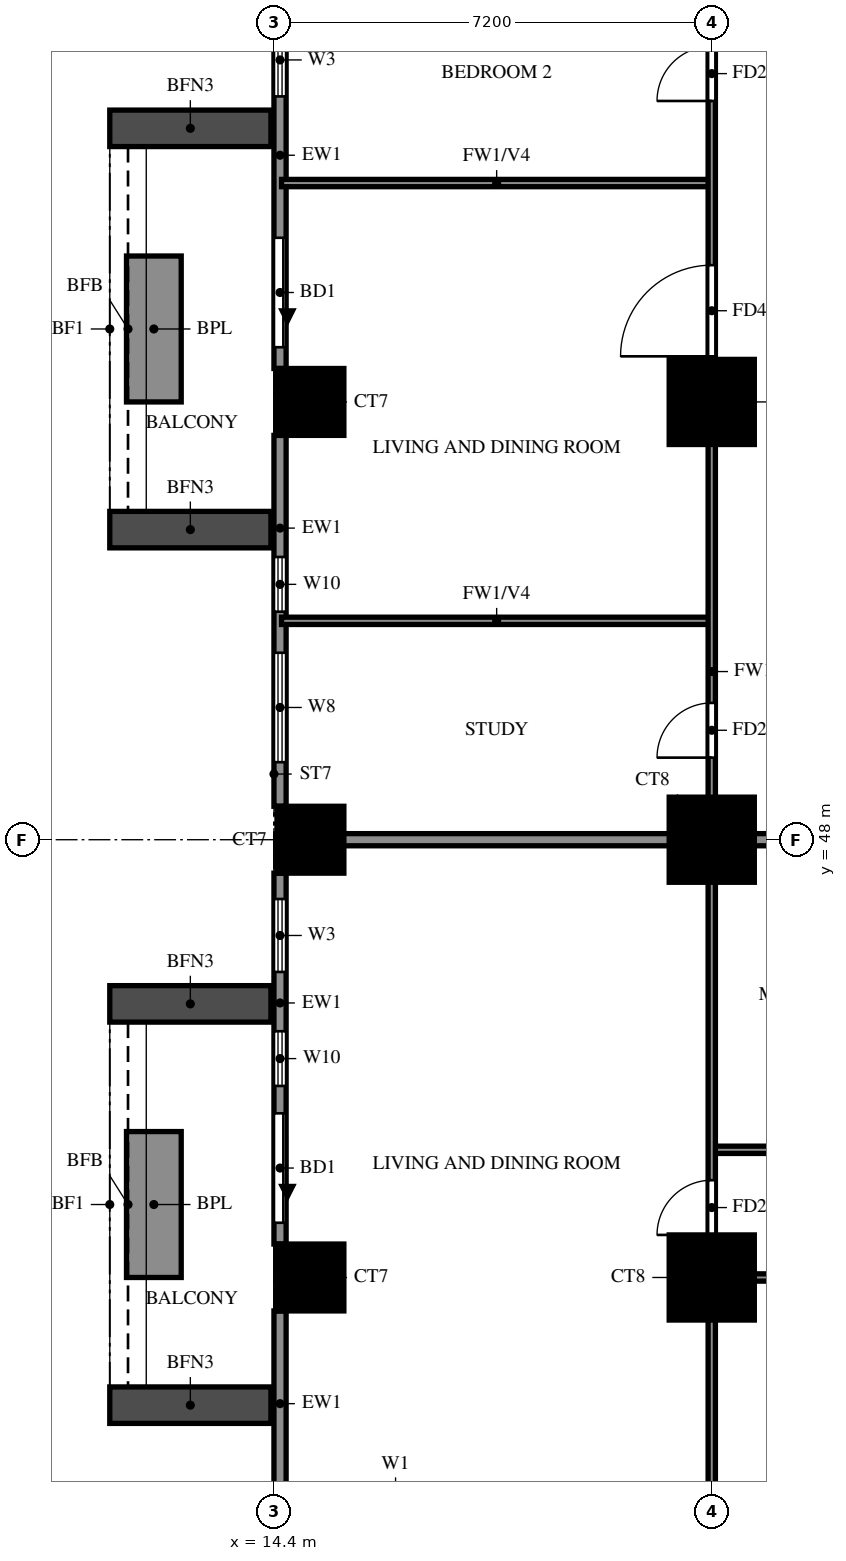
"""IFC4 building model, lengths in metres.
Left out: names, types, materials, properties, quantities, classifications, styles, units other than length and angle.
Written with IfcOpenShell. Run it as: python <this file> out.ifc"""

import sys

from ifc_helpers import new_model, si_unit, direction, frame, frame_2d, origin, origin_2d, place, context, subcontext, project, spatial, rectangle, extrude, source, transform, mapped, element, fill, save


model = new_model("IFC4")
c1 = context("Model", 3, precision=1e-05, world=origin(), true_north=direction((0.0, 1.0)))
c2 = subcontext(c1, "Body", "Model", "MODEL_VIEW")
j1 = project(units=[si_unit("LENGTHUNIT", "METRE"), si_unit("PLANEANGLEUNIT", "RADIAN")], contexts=[c1])
p1 = place(None, origin())
s1 = spatial("IfcSite", under=j1, at=p1, CompositionType="ELEMENT")
p2 = place(p1, origin())
s2 = spatial("IfcBuilding", under=s1, at=p2, CompositionType="ELEMENT")
p3 = place(p2, frame((0.0, 0.0, 30.5)))
s3 = spatial("IfcBuildingStorey", under=s2, at=p3, CompositionType="ELEMENT", Elevation=30.5)
m1 = source(origin(), c2, "Body", "SweptSolid", [
    extrude(rectangle(XDim=1.1, YDim=1.1, at=origin_2d()), origin(), (0.0, 0.0, 1.0), 3.18),
])
p4 = place(p3, frame((15.0, 40.8, 0.0), z_axis=(0.0, 0.0, 1.0), x_axis=(1.0, 0.0, 0.0)))
e1 = element("IfcColumn", 1, at=p4, inside=s3, PredefinedType="COLUMN", context=c2, shape_type="MappedRepresentation", body=[
    mapped(m1, transform((0.0, 0.0, 0.0))),
])
m2 = source(origin(), c2, "Body", "SweptSolid", [
    extrude(rectangle(XDim=1.4, YDim=1.4, at=origin_2d()), origin(), (0.0, 0.0, 1.0), 3.18),
])
p5 = place(p3, frame((21.6, 40.8, 0.0), z_axis=(0.0, 0.0, 1.0), x_axis=(1.0, 0.0, 0.0)))
e2 = element("IfcColumn", 2, at=p5, inside=s3, PredefinedType="COLUMN", context=c2, shape_type="MappedRepresentation", body=[
    mapped(m2, transform((0.0, 0.0, 0.0))),
])
p6 = place(p3, frame((15.0, 48.0, 0.0), z_axis=(0.0, 0.0, 1.0), x_axis=(1.0, 0.0, 0.0)))
e3 = element("IfcColumn", 3, at=p6, inside=s3, PredefinedType="COLUMN", context=c2, shape_type="MappedRepresentation", body=[
    mapped(m1, transform((0.0, 0.0, 0.0))),
])
p7 = place(p3, frame((21.6, 48.0, 0.0), z_axis=(0.0, 0.0, 1.0), x_axis=(1.0, 0.0, 0.0)))
e4 = element("IfcColumn", 4, at=p7, inside=s3, PredefinedType="COLUMN", context=c2, shape_type="MappedRepresentation", body=[
    mapped(m2, transform((0.0, 0.0, 0.0))),
])
p8 = place(p3, frame((15.0, 55.2, 0.0), z_axis=(0.0, 0.0, 1.0), x_axis=(1.0, 0.0, 0.0)))
e5 = element("IfcColumn", 5, at=p8, inside=s3, PredefinedType="COLUMN", context=c2, shape_type="MappedRepresentation", body=[
    mapped(m1, transform((0.0, 0.0, 0.0))),
])
p9 = place(p3, frame((21.6, 55.2, 0.0), z_axis=(0.0, 0.0, 1.0), x_axis=(1.0, 0.0, 0.0)))
e6 = element("IfcColumn", 6, at=p9, inside=s3, PredefinedType="COLUMN", context=c2, shape_type="MappedRepresentation", body=[
    mapped(m2, transform((0.0, 0.0, 0.0))),
])
p10 = place(p3, frame((14.5, 61.85, 0.0), z_axis=(0.0, 0.0, 1.0), x_axis=(0.0, -1.0, 0.0)))
e7 = element("IfcWall", 7, at=p10, inside=s3, PredefinedType="SOLIDWALL", context=c2, shape_type="SweptSolid", body=[
    extrude(rectangle(XDim=6.1, YDim=0.2, at=frame_2d((3.05, 0.0))), origin(), (0.0, 0.0, 1.0), 3.18),
])
p11 = place(p10, frame((3.95, 0.0, 0.0)))
e8 = element("IfcOpeningElement", 8, at=p11, cuts=e7, PredefinedType="OPENING", context=c2, shape_type="SweptSolid", body=[
    extrude(rectangle(XDim=1.8, YDim=2.4, at=frame_2d((0.9, 1.2))), frame((0.0, 0.11, 0.0), z_axis=(0.0, -1.0, 0.0), x_axis=(1.0, 0.0, 0.0)), (0.0, 0.0, 1.0), 0.22),
])
p12 = place(p10, frame((0.425, 0.0, 0.6)))
e9 = element("IfcOpeningElement", 9, at=p12, cuts=e7, PredefinedType="OPENING", context=c2, shape_type="SweptSolid", body=[
    extrude(rectangle(XDim=1.2, YDim=2.4, at=frame_2d((0.6, 1.2))), frame((0.0, 0.11, 0.0), z_axis=(0.0, -1.0, 0.0), x_axis=(1.0, 0.0, 0.0)), (0.0, 0.0, 1.0), 0.22),
])
p13 = place(p3, frame((14.5, 54.65, 0.0), z_axis=(0.0, 0.0, 1.0), x_axis=(0.0, -1.0, 0.0)))
e10 = element("IfcWall", 10, at=p13, inside=s3, PredefinedType="SOLIDWALL", context=c2, shape_type="SweptSolid", body=[
    extrude(rectangle(XDim=6.1, YDim=0.2, at=frame_2d((3.05, 0.0))), origin(), (0.0, 0.0, 1.0), 3.18),
])
p14 = place(p13, frame((3.575, 0.0, 0.6)))
e11 = element("IfcOpeningElement", 11, at=p14, cuts=e10, PredefinedType="OPENING", context=c2, shape_type="SweptSolid", body=[
    extrude(rectangle(XDim=1.8, YDim=2.4, at=frame_2d((0.9, 1.2))), frame((0.0, 0.11, 0.0), z_axis=(0.0, -1.0, 0.0), x_axis=(1.0, 0.0, 0.0)), (0.0, 0.0, 1.0), 0.22),
])
p15 = place(p13, frame((2.0, 0.0, 0.6)))
e12 = element("IfcOpeningElement", 12, at=p15, cuts=e10, PredefinedType="OPENING", context=c2, shape_type="SweptSolid", body=[
    extrude(rectangle(XDim=0.9, YDim=2.4, at=frame_2d((0.45, 1.2))), frame((0.0, 0.11, 0.0), z_axis=(0.0, -1.0, 0.0), x_axis=(1.0, 0.0, 0.0)), (0.0, 0.0, 1.0), 0.22),
])
p16 = place(p3, frame((14.5, 47.45, 0.0), z_axis=(0.0, 0.0, 1.0), x_axis=(0.0, -1.0, 0.0)))
e13 = element("IfcWall", 13, at=p16, inside=s3, PredefinedType="SOLIDWALL", context=c2, shape_type="SweptSolid", body=[
    extrude(rectangle(XDim=6.1, YDim=0.2, at=frame_2d((3.05, 0.0))), origin(), (0.0, 0.0, 1.0), 3.18),
])
p17 = place(p16, frame((3.95, 0.0, 0.0)))
e14 = element("IfcOpeningElement", 14, at=p17, cuts=e13, PredefinedType="OPENING", context=c2, shape_type="SweptSolid", body=[
    extrude(rectangle(XDim=1.8, YDim=2.4, at=frame_2d((0.9, 1.2))), frame((0.0, 0.11, 0.0), z_axis=(0.0, -1.0, 0.0), x_axis=(1.0, 0.0, 0.0)), (0.0, 0.0, 1.0), 0.22),
])
p18 = place(p16, frame((0.425, 0.0, 0.6)))
e15 = element("IfcOpeningElement", 15, at=p18, cuts=e13, PredefinedType="OPENING", context=c2, shape_type="SweptSolid", body=[
    extrude(rectangle(XDim=1.2, YDim=2.4, at=frame_2d((0.6, 1.2))), frame((0.0, 0.11, 0.0), z_axis=(0.0, -1.0, 0.0), x_axis=(1.0, 0.0, 0.0)), (0.0, 0.0, 1.0), 0.22),
])
p19 = place(p16, frame((2.6, 0.0, 0.6)))
e16 = element("IfcOpeningElement", 16, at=p19, cuts=e13, PredefinedType="OPENING", context=c2, shape_type="SweptSolid", body=[
    extrude(rectangle(XDim=0.9, YDim=2.4, at=frame_2d((0.45, 1.2))), frame((0.0, 0.11, 0.0), z_axis=(0.0, -1.0, 0.0), x_axis=(1.0, 0.0, 0.0)), (0.0, 0.0, 1.0), 0.22),
])
p20 = place(p3, frame((14.5, 40.25, 0.0), z_axis=(0.0, 0.0, 1.0), x_axis=(0.0, -1.0, 0.0)))
e17 = element("IfcWall", 17, at=p20, inside=s3, PredefinedType="SOLIDWALL", context=c2, shape_type="SweptSolid", body=[
    extrude(rectangle(XDim=3.05, YDim=0.2, at=frame_2d((1.525, 0.0))), origin(), (0.0, 0.0, 1.0), 3.18),
])
for number, where, z_axis, x_axis in (
    (18, (14.35, 59.7, 0.0), (0.0, 0.0, 1.0), (-1.0, 0.0, 0.0)),
    (19, (14.35, 53.1, 0.0), (0.0, 0.0, 1.0), (-1.0, 0.0, 0.0)),
):
    element("IfcWall", number, at=place(p3, frame(where, z_axis=z_axis, x_axis=x_axis)), inside=s3, PredefinedType="SOLIDWALL", context=c2, shape_type="SweptSolid", body=[
        extrude(rectangle(XDim=2.65, YDim=0.6, at=frame_2d((1.325, 0.0))), origin(), (0.0, 0.0, 1.0), 2.85),
    ])
p21 = place(p3, frame((12.425, 57.6, 0.0), z_axis=(0.0, 0.0, 1.0), x_axis=(0.0, -1.0, 0.0)))
e20 = element("IfcWall", 20, at=p21, inside=s3, PredefinedType="SOLIDWALL", context=c2, shape_type="SweptSolid", body=[
    extrude(rectangle(XDim=2.4, YDim=0.9, at=frame_2d((1.2, 0.0))), origin(), (0.0, 0.0, 1.0), 0.9),
])
for number, where, z_axis, x_axis in (
    (21, (14.35, 45.3, 0.0), (0.0, 0.0, 1.0), (-1.0, 0.0, 0.0)),
    (22, (14.35, 38.7, 0.0), (0.0, 0.0, 1.0), (-1.0, 0.0, 0.0)),
):
    element("IfcWall", number, at=place(p3, frame(where, z_axis=z_axis, x_axis=x_axis)), inside=s3, PredefinedType="SOLIDWALL", context=c2, shape_type="SweptSolid", body=[
        extrude(rectangle(XDim=2.65, YDim=0.6, at=frame_2d((1.325, 0.0))), origin(), (0.0, 0.0, 1.0), 2.85),
    ])
p22 = place(p3, frame((12.425, 43.2, 0.0), z_axis=(0.0, 0.0, 1.0), x_axis=(0.0, -1.0, 0.0)))
e23 = element("IfcWall", 23, at=p22, inside=s3, PredefinedType="SOLIDWALL", context=c2, shape_type="SweptSolid", body=[
    extrude(rectangle(XDim=2.4, YDim=0.9, at=frame_2d((1.2, 0.0))), origin(), (0.0, 0.0, 1.0), 0.9),
])
p23 = place(p3, frame((14.525, 48.0, 0.0), z_axis=(0.0, 0.0, 1.0), x_axis=(1.0, 0.0, 0.0)))
e24 = element("IfcWall", 24, at=p23, inside=s3, PredefinedType="SOLIDWALL", context=c2, shape_type="SweptSolid", body=[
    extrude(rectangle(XDim=19.075, YDim=0.2, at=frame_2d((9.538, 0.0))), origin(), (0.0, 0.0, 1.0), 3.18),
])
p24 = place(p3, frame((21.6, 40.8, 0.0), z_axis=(0.0, 0.0, 1.0), x_axis=(1.0, 0.0, 0.0)))
e25 = element("IfcWall", 25, at=p24, inside=s3, PredefinedType="PARTITIONING", context=c2, shape_type="SweptSolid", body=[
    extrude(rectangle(XDim=7.2, YDim=0.12, at=frame_2d((3.6, 0.0))), origin(), (0.0, 0.0, 1.0), 3.18),
])
p25 = place(p24, frame((1.35, 0.0, 0.0)))
e26 = element("IfcOpeningElement", 26, at=p25, cuts=e25, PredefinedType="OPENING", context=c2, shape_type="SweptSolid", body=[
    extrude(rectangle(XDim=0.9, YDim=2.1, at=frame_2d((0.45, 1.05))), frame((0.0, 0.07, 0.0), z_axis=(0.0, -1.0, 0.0), x_axis=(1.0, 0.0, 0.0)), (0.0, 0.0, 1.0), 0.14),
])
p26 = place(p24, frame((4.95, 0.0, 0.0)))
e27 = element("IfcOpeningElement", 27, at=p26, cuts=e25, PredefinedType="OPENING", context=c2, shape_type="SweptSolid", body=[
    extrude(rectangle(XDim=0.9, YDim=2.1, at=frame_2d((0.45, 1.05))), frame((0.0, 0.07, 0.0), z_axis=(0.0, -1.0, 0.0), x_axis=(1.0, 0.0, 0.0)), (0.0, 0.0, 1.0), 0.14),
])
p27 = place(p3, frame((21.6, 42.9, 0.0), z_axis=(0.0, 0.0, 1.0), x_axis=(1.0, 0.0, 0.0)))
e28 = element("IfcWall", 28, at=p27, inside=s3, PredefinedType="PARTITIONING", context=c2, shape_type="SweptSolid", body=[
    extrude(rectangle(XDim=15.6, YDim=0.12, at=frame_2d((7.8, 0.0))), origin(), (0.0, 0.0, 1.0), 3.18),
])
p28 = place(p27, frame((1.375, 0.0, 0.0)))
e29 = element("IfcOpeningElement", 29, at=p28, cuts=e28, PredefinedType="OPENING", context=c2, shape_type="SweptSolid", body=[
    extrude(rectangle(XDim=0.9, YDim=2.1, at=frame_2d((0.45, 1.05))), frame((0.0, 0.07, 0.0), z_axis=(0.0, -1.0, 0.0), x_axis=(1.0, 0.0, 0.0)), (0.0, 0.0, 1.0), 0.14),
])
p29 = place(p27, frame((5.5, 0.0, 0.0)))
e30 = element("IfcOpeningElement", 30, at=p29, cuts=e28, PredefinedType="OPENING", context=c2, shape_type="SweptSolid", body=[
    extrude(rectangle(XDim=0.9, YDim=2.1, at=frame_2d((0.45, 1.05))), frame((0.0, 0.07, 0.0), z_axis=(0.0, -1.0, 0.0), x_axis=(1.0, 0.0, 0.0)), (0.0, 0.0, 1.0), 0.14),
])
p30 = place(p27, frame((9.725, 0.0, 0.0)))
e31 = element("IfcOpeningElement", 31, at=p30, cuts=e28, PredefinedType="OPENING", context=c2, shape_type="SweptSolid", body=[
    extrude(rectangle(XDim=0.8, YDim=2.1, at=frame_2d((0.4, 1.05))), frame((0.0, 0.07, 0.0), z_axis=(0.0, -1.0, 0.0), x_axis=(1.0, 0.0, 0.0)), (0.0, 0.0, 1.0), 0.14),
])
p31 = place(p27, frame((13.35, 0.0, 0.0)))
e32 = element("IfcOpeningElement", 32, at=p31, cuts=e28, PredefinedType="OPENING", context=c2, shape_type="SweptSolid", body=[
    extrude(rectangle(XDim=0.9, YDim=2.1, at=frame_2d((0.45, 1.05))), frame((0.0, 0.07, 0.0), z_axis=(0.0, -1.0, 0.0), x_axis=(1.0, 0.0, 0.0)), (0.0, 0.0, 1.0), 0.14),
])
for number, where, z_axis, x_axis in (
    (33, (14.525, 51.6, 0.0), (0.0, 0.0, 1.0), (1.0, 0.0, 0.0)),
    (34, (14.525, 58.8, 0.0), (0.0, 0.0, 1.0), (1.0, 0.0, 0.0)),
):
    element("IfcWall", number, at=place(p3, frame(where, z_axis=z_axis, x_axis=x_axis)), inside=s3, PredefinedType="PARTITIONING", context=c2, shape_type="SweptSolid", body=[
        extrude(rectangle(XDim=7.075, YDim=0.12, at=frame_2d((3.538, 0.0))), origin(), (0.0, 0.0, 1.0), 2.28),
    ])
p32 = place(p3, frame((21.6, 33.725, 0.0), z_axis=(0.0, 0.0, 1.0), x_axis=(0.0, 1.0, 0.0)))
e35 = element("IfcWall", 35, at=p32, inside=s3, PredefinedType="PARTITIONING", context=c2, shape_type="SweptSolid", body=[
    extrude(rectangle(XDim=35.875, YDim=0.12, at=frame_2d((17.938, 0.0))), origin(), (0.0, 0.0, 1.0), 3.18),
])
p33 = place(p32, frame((7.775, 0.0, 0.0)))
e36 = element("IfcOpeningElement", 36, at=p33, cuts=e35, PredefinedType="OPENING", context=c2, shape_type="SweptSolid", body=[
    extrude(rectangle(XDim=0.9, YDim=2.1, at=frame_2d((0.45, 1.05))), frame((0.0, 0.07, 0.0), z_axis=(0.0, -1.0, 0.0), x_axis=(1.0, 0.0, 0.0)), (0.0, 0.0, 1.0), 0.14),
])
p34 = place(p32, frame((15.625, 0.0, 0.0)))
e37 = element("IfcOpeningElement", 37, at=p34, cuts=e35, PredefinedType="OPENING", context=c2, shape_type="SweptSolid", body=[
    extrude(rectangle(XDim=0.9, YDim=2.1, at=frame_2d((0.45, 1.05))), frame((0.0, 0.07, 0.0), z_axis=(0.0, -1.0, 0.0), x_axis=(1.0, 0.0, 0.0)), (0.0, 0.0, 1.0), 0.14),
])
p35 = place(p32, frame((22.225, 0.0, 0.0)))
e38 = element("IfcOpeningElement", 38, at=p35, cuts=e35, PredefinedType="OPENING", context=c2, shape_type="SweptSolid", body=[
    extrude(rectangle(XDim=1.5, YDim=2.1, at=frame_2d((0.75, 1.05))), frame((0.0, 0.07, 0.0), z_axis=(0.0, -1.0, 0.0), x_axis=(1.0, 0.0, 0.0)), (0.0, 0.0, 1.0), 0.14),
])
p36 = place(p32, frame((26.425, 0.0, 0.0)))
e39 = element("IfcOpeningElement", 39, at=p36, cuts=e35, PredefinedType="OPENING", context=c2, shape_type="SweptSolid", body=[
    extrude(rectangle(XDim=0.9, YDim=2.1, at=frame_2d((0.45, 1.05))), frame((0.0, 0.07, 0.0), z_axis=(0.0, -1.0, 0.0), x_axis=(1.0, 0.0, 0.0)), (0.0, 0.0, 1.0), 0.14),
])
p37 = place(p32, frame((30.025, 0.0, 0.0)))
e40 = element("IfcOpeningElement", 40, at=p37, cuts=e35, PredefinedType="OPENING", context=c2, shape_type="SweptSolid", body=[
    extrude(rectangle(XDim=0.9, YDim=2.1, at=frame_2d((0.45, 1.05))), frame((0.0, 0.07, 0.0), z_axis=(0.0, -1.0, 0.0), x_axis=(1.0, 0.0, 0.0)), (0.0, 0.0, 1.0), 0.14),
])
p38 = place(p32, frame((33.625, 0.0, 0.0)))
e41 = element("IfcOpeningElement", 41, at=p38, cuts=e35, PredefinedType="OPENING", context=c2, shape_type="SweptSolid", body=[
    extrude(rectangle(XDim=0.9, YDim=2.1, at=frame_2d((0.45, 1.05))), frame((0.0, 0.07, 0.0), z_axis=(0.0, -1.0, 0.0), x_axis=(1.0, 0.0, 0.0)), (0.0, 0.0, 1.0), 0.14),
])
p39 = place(p11, origin())
e42 = element("IfcDoor", 42, at=p39, inside=s3, OperationType="DOUBLE_DOOR_SLIDING", PredefinedType="DOOR", context=c2, shape_type="SweptSolid", body=[
    extrude(rectangle(XDim=1.8, YDim=2.4, at=frame_2d((0.9, 1.2))), frame((0.0, 0.025, 0.0), z_axis=(0.0, -1.0, 0.0), x_axis=(1.0, 0.0, 0.0)), (0.0, 0.0, 1.0), 0.05),
])
fill(e8, e42)
p40 = place(p12, origin())
e43 = element("IfcWindow", 43, at=p40, inside=s3, PartitioningType="SINGLE_PANEL", PredefinedType="WINDOW", context=c2, shape_type="SweptSolid", body=[
    extrude(rectangle(XDim=1.2, YDim=2.4, at=frame_2d((0.6, 1.2))), frame((0.0, 0.03, 0.0), z_axis=(0.0, -1.0, 0.0), x_axis=(1.0, 0.0, 0.0)), (0.0, 0.0, 1.0), 0.06),
])
fill(e9, e43)
p41 = place(p14, origin())
e44 = element("IfcWindow", 44, at=p41, inside=s3, PartitioningType="DOUBLE_PANEL_VERTICAL", PredefinedType="WINDOW", context=c2, shape_type="SweptSolid", body=[
    extrude(rectangle(XDim=1.8, YDim=2.4, at=frame_2d((0.9, 1.2))), frame((0.0, 0.03, 0.0), z_axis=(0.0, -1.0, 0.0), x_axis=(1.0, 0.0, 0.0)), (0.0, 0.0, 1.0), 0.06),
])
fill(e11, e44)
p42 = place(p15, origin())
e45 = element("IfcWindow", 45, at=p42, inside=s3, PartitioningType="SINGLE_PANEL", PredefinedType="WINDOW", context=c2, shape_type="SweptSolid", body=[
    extrude(rectangle(XDim=0.9, YDim=2.4, at=frame_2d((0.45, 1.2))), frame((0.0, 0.03, 0.0), z_axis=(0.0, -1.0, 0.0), x_axis=(1.0, 0.0, 0.0)), (0.0, 0.0, 1.0), 0.06),
])
fill(e12, e45)
p43 = place(p17, origin())
e46 = element("IfcDoor", 46, at=p43, inside=s3, OperationType="DOUBLE_DOOR_SLIDING", PredefinedType="DOOR", context=c2, shape_type="SweptSolid", body=[
    extrude(rectangle(XDim=1.8, YDim=2.4, at=frame_2d((0.9, 1.2))), frame((0.0, 0.025, 0.0), z_axis=(0.0, -1.0, 0.0), x_axis=(1.0, 0.0, 0.0)), (0.0, 0.0, 1.0), 0.05),
])
fill(e14, e46)
p44 = place(p18, origin())
e47 = element("IfcWindow", 47, at=p44, inside=s3, PartitioningType="SINGLE_PANEL", PredefinedType="WINDOW", context=c2, shape_type="SweptSolid", body=[
    extrude(rectangle(XDim=1.2, YDim=2.4, at=frame_2d((0.6, 1.2))), frame((0.0, 0.03, 0.0), z_axis=(0.0, -1.0, 0.0), x_axis=(1.0, 0.0, 0.0)), (0.0, 0.0, 1.0), 0.06),
])
fill(e15, e47)
p45 = place(p19, origin())
e48 = element("IfcWindow", 48, at=p45, inside=s3, PartitioningType="SINGLE_PANEL", PredefinedType="WINDOW", context=c2, shape_type="SweptSolid", body=[
    extrude(rectangle(XDim=0.9, YDim=2.4, at=frame_2d((0.45, 1.2))), frame((0.0, 0.03, 0.0), z_axis=(0.0, -1.0, 0.0), x_axis=(1.0, 0.0, 0.0)), (0.0, 0.0, 1.0), 0.06),
])
fill(e16, e48)
p46 = place(p33, origin())
e49 = element("IfcDoor", 49, at=p46, inside=s3, OperationType="SINGLE_SWING_RIGHT", PredefinedType="DOOR", context=c2, shape_type="SweptSolid", body=[
    extrude(rectangle(XDim=0.9, YDim=2.1, at=frame_2d((0.45, 1.05))), frame((0.0, 0.025, 0.0), z_axis=(0.0, -1.0, 0.0), x_axis=(1.0, 0.0, 0.0)), (0.0, 0.0, 1.0), 0.05),
])
fill(e36, e49)
p47 = place(p34, origin())
e50 = element("IfcDoor", 50, at=p47, inside=s3, OperationType="SINGLE_SWING_RIGHT", PredefinedType="DOOR", context=c2, shape_type="SweptSolid", body=[
    extrude(rectangle(XDim=0.9, YDim=2.1, at=frame_2d((0.45, 1.05))), frame((0.0, 0.025, 0.0), z_axis=(0.0, -1.0, 0.0), x_axis=(1.0, 0.0, 0.0)), (0.0, 0.0, 1.0), 0.05),
])
fill(e37, e50)
p48 = place(p35, origin())
e51 = element("IfcDoor", 51, at=p48, inside=s3, OperationType="SINGLE_SWING_RIGHT", PredefinedType="DOOR", context=c2, shape_type="SweptSolid", body=[
    extrude(rectangle(XDim=1.5, YDim=2.1, at=frame_2d((0.75, 1.05))), frame((0.0, 0.025, 0.0), z_axis=(0.0, -1.0, 0.0), x_axis=(1.0, 0.0, 0.0)), (0.0, 0.0, 1.0), 0.05),
])
fill(e38, e51)
p49 = place(p36, origin())
e52 = element("IfcDoor", 52, at=p49, inside=s3, OperationType="SINGLE_SWING_LEFT", PredefinedType="DOOR", context=c2, shape_type="SweptSolid", body=[
    extrude(rectangle(XDim=0.9, YDim=2.1, at=frame_2d((0.45, 1.05))), frame((0.0, 0.025, 0.0), z_axis=(0.0, -1.0, 0.0), x_axis=(1.0, 0.0, 0.0)), (0.0, 0.0, 1.0), 0.05),
])
fill(e39, e52)
save(model, sys.argv[1])
